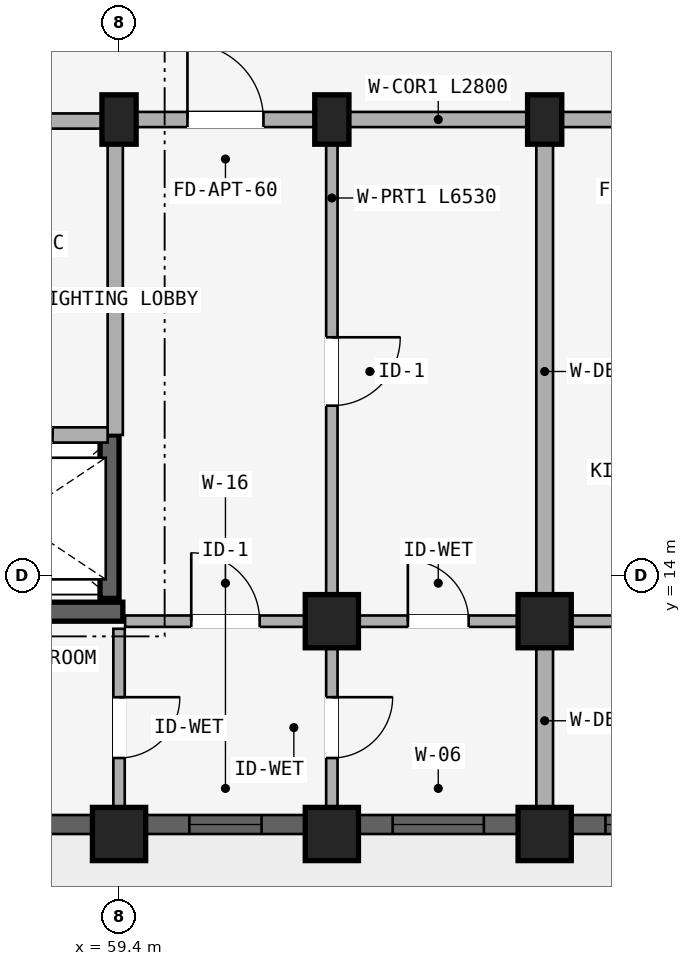
"""IFC4 building model, lengths in metres.
Left out: names, types, materials, properties, quantities, classifications, styles, units other than length and angle.
Written with IfcOpenShell. Run it as: python <this file> out.ifc"""

import sys

from ifc_helpers import new_model, si_unit, direction, frame, frame_2d, origin, origin_2d, place, context, subcontext, project, spatial, rectangle, extrude, element, fill, save


model = new_model("IFC4")
c1 = context("Model", 3, precision=1e-05, world=origin(), true_north=direction((0.0, 1.0)))
c2 = subcontext(c1, "Body", "Model", "MODEL_VIEW")
j1 = project(units=[si_unit("LENGTHUNIT", "METRE"), si_unit("PLANEANGLEUNIT", "RADIAN")], contexts=[c1])
p1 = place(None, origin())
s1 = spatial("IfcSite", under=j1, at=p1, CompositionType="ELEMENT")
p2 = place(p1, origin())
s2 = spatial("IfcBuilding", under=s1, at=p2, CompositionType="ELEMENT")
p3 = place(p2, frame((0.0, 0.0, 27.6)))
s3 = spatial("IfcBuildingStorey", under=s2, at=p3, CompositionType="ELEMENT", Elevation=27.6)
p4 = place(p3, frame((56.65, 13.525, 0.0), z_axis=(0.0, 0.0, 1.0), x_axis=(1.0, 0.0, 0.0)))
e1 = element("IfcWall", 1, at=p4, inside=s3, PredefinedType="SHEAR", context=c2, shape_type="SweptSolid", body=[
    extrude(rectangle(XDim=2.8, YDim=0.25, at=frame_2d((1.4, 0.0))), origin(), (0.0, 0.0, 1.0), 2.93),
])
p5 = place(p3, frame((59.275, 15.85, 0.0), z_axis=(0.0, 0.0, 1.0), x_axis=(0.0, -1.0, 0.0)))
e2 = element("IfcWall", 2, at=p5, inside=s3, PredefinedType="SHEAR", context=c2, shape_type="SweptSolid", body=[
    extrude(rectangle(XDim=2.15, YDim=0.25, at=frame_2d((1.075, 0.0))), origin(), (0.0, 0.0, 1.0), 2.93),
])
p6 = place(p3, frame((59.4, 20.0, 0.0), z_axis=(0.0, 0.0, 1.0), x_axis=(1.0, 0.0, 0.0)))
e3 = element("IfcColumn", 3, at=p6, inside=s3, PredefinedType="COLUMN", context=c2, shape_type="SweptSolid", body=[
    extrude(rectangle(XDim=0.45, YDim=0.65, at=origin_2d()), origin(), (0.0, 0.0, 1.0), 2.93),
])
p7 = place(p3, frame((59.4, 10.6, 0.0), z_axis=(0.0, 0.0, 1.0), x_axis=(1.0, 0.0, 0.0)))
e4 = element("IfcColumn", 4, at=p7, inside=s3, PredefinedType="COLUMN", context=c2, shape_type="SweptSolid", body=[
    extrude(rectangle(XDim=0.7, YDim=0.7, at=origin_2d()), origin(), (0.0, 0.0, 1.0), 2.97),
])
p8 = place(p3, frame((62.2, 20.0, 0.0), z_axis=(0.0, 0.0, 1.0), x_axis=(1.0, 0.0, 0.0)))
e5 = element("IfcColumn", 5, at=p8, inside=s3, PredefinedType="COLUMN", context=c2, shape_type="SweptSolid", body=[
    extrude(rectangle(XDim=0.45, YDim=0.65, at=origin_2d()), origin(), (0.0, 0.0, 1.0), 2.93),
])
p9 = place(p3, frame((62.2, 13.4, 0.0), z_axis=(0.0, 0.0, 1.0), x_axis=(1.0, 0.0, 0.0)))
e6 = element("IfcColumn", 6, at=p9, inside=s3, PredefinedType="COLUMN", context=c2, shape_type="SweptSolid", body=[
    extrude(rectangle(XDim=0.7, YDim=0.7, at=origin_2d()), origin(), (0.0, 0.0, 1.0), 2.93),
])
p10 = place(p3, frame((62.2, 10.6, 0.0), z_axis=(0.0, 0.0, 1.0), x_axis=(1.0, 0.0, 0.0)))
e7 = element("IfcColumn", 7, at=p10, inside=s3, PredefinedType="COLUMN", context=c2, shape_type="SweptSolid", body=[
    extrude(rectangle(XDim=0.7, YDim=0.7, at=origin_2d()), origin(), (0.0, 0.0, 1.0), 2.97),
])
p11 = place(p3, frame((65.0, 20.0, 0.0), z_axis=(0.0, 0.0, 1.0), x_axis=(1.0, 0.0, 0.0)))
e8 = element("IfcColumn", 8, at=p11, inside=s3, PredefinedType="COLUMN", context=c2, shape_type="SweptSolid", body=[
    extrude(rectangle(XDim=0.45, YDim=0.65, at=origin_2d()), origin(), (0.0, 0.0, 1.0), 2.93),
])
p12 = place(p3, frame((65.0, 13.4, 0.0), z_axis=(0.0, 0.0, 1.0), x_axis=(1.0, 0.0, 0.0)))
e9 = element("IfcColumn", 9, at=p12, inside=s3, PredefinedType="COLUMN", context=c2, shape_type="SweptSolid", body=[
    extrude(rectangle(XDim=0.7, YDim=0.7, at=origin_2d()), origin(), (0.0, 0.0, 1.0), 2.93),
])
p13 = place(p3, frame((65.0, 10.6, 0.0), z_axis=(0.0, 0.0, 1.0), x_axis=(1.0, 0.0, 0.0)))
e10 = element("IfcColumn", 10, at=p13, inside=s3, PredefinedType="COLUMN", context=c2, shape_type="SweptSolid", body=[
    extrude(rectangle(XDim=0.7, YDim=0.7, at=origin_2d()), origin(), (0.0, 0.0, 1.0), 2.97),
])
p14 = place(p3, frame((53.7, 19.98, 0.0), z_axis=(0.0, 0.0, 1.0), x_axis=(1.0, 0.0, 0.0)))
e11 = element("IfcWall", 11, at=p14, inside=s3, PredefinedType="STANDARD", context=c2, shape_type="SweptSolid", body=[
    extrude(rectangle(XDim=5.65, YDim=0.2, at=frame_2d((2.825, 0.0))), origin(), (0.0, 0.0, 1.0), 2.372),
])
p15 = place(p14, frame((1.923, 0.0, 0.0)))
e12 = element("IfcOpeningElement", 12, at=p15, cuts=e11, PredefinedType="OPENING", context=c2, shape_type="SweptSolid", body=[
    extrude(rectangle(XDim=1.24, YDim=2.15, at=frame_2d((0.62, 1.075))), frame((0.0, 0.11, 0.0), z_axis=(0.0, -1.0, 0.0), x_axis=(1.0, 0.0, 0.0)), (0.0, 0.0, 1.0), 0.22),
])
p16 = place(p3, frame((59.35, 19.98, 0.0), z_axis=(0.0, 0.0, 1.0), x_axis=(0.0, -1.0, 0.0)))
e13 = element("IfcWall", 13, at=p16, inside=s3, PredefinedType="STANDARD", context=c2, shape_type="SweptSolid", body=[
    extrude(rectangle(XDim=4.13, YDim=0.2, at=frame_2d((2.065, 0.0))), origin(), (0.0, 0.0, 1.0), 2.372),
])
p17 = place(p3, frame((56.7, 15.85, 0.0), z_axis=(0.0, 0.0, 1.0), x_axis=(1.0, 0.0, 0.0)))
e14 = element("IfcWall", 14, at=p17, inside=s3, PredefinedType="STANDARD", context=c2, shape_type="SweptSolid", body=[
    extrude(rectangle(XDim=2.55, YDim=0.2, at=frame_2d((1.275, 0.0))), origin(), (0.0, 0.0, 1.0), 2.372),
])
p18 = place(p17, frame((0.725, 0.0, 0.0)))
e15 = element("IfcOpeningElement", 15, at=p18, cuts=e14, PredefinedType="OPENING", context=c2, shape_type="SweptSolid", body=[
    extrude(rectangle(XDim=1.1, YDim=2.15, at=frame_2d((0.55, 1.075))), frame((0.0, 0.11, 0.0), z_axis=(0.0, -1.0, 0.0), x_axis=(1.0, 0.0, 0.0)), (0.0, 0.0, 1.0), 0.22),
])
p19 = place(p3, frame((59.4, 20.0, 0.0), z_axis=(0.0, 0.0, 1.0), x_axis=(1.0, 0.0, 0.0)))
e16 = element("IfcWall", 16, at=p19, inside=s3, PredefinedType="STANDARD", context=c2, shape_type="SweptSolid", body=[
    extrude(rectangle(XDim=2.8, YDim=0.2, at=frame_2d((1.4, 0.0))), origin(), (0.0, 0.0, 1.0), 2.372),
])
p20 = place(p19, frame((0.9, 0.0, 0.0)))
e17 = element("IfcOpeningElement", 17, at=p20, cuts=e16, PredefinedType="OPENING", context=c2, shape_type="SweptSolid", body=[
    extrude(rectangle(XDim=1.0, YDim=2.15, at=frame_2d((0.5, 1.075))), frame((0.0, 0.11, 0.0), z_axis=(0.0, -1.0, 0.0), x_axis=(1.0, 0.0, 0.0)), (0.0, 0.0, 1.0), 0.22),
])
p21 = place(p3, frame((59.48, 13.4, 0.0), z_axis=(0.0, 0.0, 1.0), x_axis=(1.0, 0.0, 0.0)))
e18 = element("IfcWall", 18, at=p21, inside=s3, PredefinedType="PLUMBINGWALL", context=c2, shape_type="SweptSolid", body=[
    extrude(rectangle(XDim=2.64, YDim=0.15, at=frame_2d((1.32, 0.0))), origin(), (0.0, 0.0, 1.0), 2.372),
])
p22 = place(p21, frame((0.87, 0.0, 0.0)))
e19 = element("IfcOpeningElement", 19, at=p22, cuts=e18, PredefinedType="OPENING", context=c2, shape_type="SweptSolid", body=[
    extrude(rectangle(XDim=0.9, YDim=2.1, at=frame_2d((0.45, 1.05))), frame((0.0, 0.085, 0.0), z_axis=(0.0, -1.0, 0.0), x_axis=(1.0, 0.0, 0.0)), (0.0, 0.0, 1.0), 0.17),
])
p23 = place(p3, frame((62.2, 20.0, 0.0), z_axis=(0.0, 0.0, 1.0), x_axis=(1.0, 0.0, 0.0)))
e20 = element("IfcWall", 20, at=p23, inside=s3, PredefinedType="STANDARD", context=c2, shape_type="SweptSolid", body=[
    extrude(rectangle(XDim=2.8, YDim=0.2, at=frame_2d((1.4, 0.0))), origin(), (0.0, 0.0, 1.0), 2.372),
])
p24 = place(p3, frame((62.28, 13.4, 0.0), z_axis=(0.0, 0.0, 1.0), x_axis=(1.0, 0.0, 0.0)))
e21 = element("IfcWall", 21, at=p24, inside=s3, PredefinedType="PLUMBINGWALL", context=c2, shape_type="SweptSolid", body=[
    extrude(rectangle(XDim=2.64, YDim=0.15, at=frame_2d((1.32, 0.0))), origin(), (0.0, 0.0, 1.0), 2.372),
])
p25 = place(p24, frame((0.92, 0.0, 0.0)))
e22 = element("IfcOpeningElement", 22, at=p25, cuts=e21, PredefinedType="OPENING", context=c2, shape_type="SweptSolid", body=[
    extrude(rectangle(XDim=0.8, YDim=2.1, at=frame_2d((0.4, 1.05))), frame((0.0, 0.085, 0.0), z_axis=(0.0, -1.0, 0.0), x_axis=(1.0, 0.0, 0.0)), (0.0, 0.0, 1.0), 0.17),
])
p26 = place(p3, frame((65.0, 20.0, 0.0), z_axis=(0.0, 0.0, 1.0), x_axis=(1.0, 0.0, 0.0)))
e23 = element("IfcWall", 23, at=p26, inside=s3, PredefinedType="STANDARD", context=c2, shape_type="SweptSolid", body=[
    extrude(rectangle(XDim=2.8, YDim=0.2, at=frame_2d((1.4, 0.0))), origin(), (0.0, 0.0, 1.0), 2.372),
])
p27 = place(p26, frame((0.9, 0.0, 0.0)))
e24 = element("IfcOpeningElement", 24, at=p27, cuts=e23, PredefinedType="OPENING", context=c2, shape_type="SweptSolid", body=[
    extrude(rectangle(XDim=1.0, YDim=2.15, at=frame_2d((0.5, 1.075))), frame((0.0, 0.11, 0.0), z_axis=(0.0, -1.0, 0.0), x_axis=(1.0, 0.0, 0.0)), (0.0, 0.0, 1.0), 0.22),
])
p28 = place(p3, frame((65.08, 13.4, 0.0), z_axis=(0.0, 0.0, 1.0), x_axis=(1.0, 0.0, 0.0)))
e25 = element("IfcWall", 25, at=p28, inside=s3, PredefinedType="PLUMBINGWALL", context=c2, shape_type="SweptSolid", body=[
    extrude(rectangle(XDim=2.64, YDim=0.15, at=frame_2d((1.32, 0.0))), origin(), (0.0, 0.0, 1.0), 2.372),
])
p29 = place(p28, frame((0.87, 0.0, 0.0)))
e26 = element("IfcOpeningElement", 26, at=p29, cuts=e25, PredefinedType="OPENING", context=c2, shape_type="SweptSolid", body=[
    extrude(rectangle(XDim=0.9, YDim=2.1, at=frame_2d((0.45, 1.05))), frame((0.0, 0.085, 0.0), z_axis=(0.0, -1.0, 0.0), x_axis=(1.0, 0.0, 0.0)), (0.0, 0.0, 1.0), 0.17),
])
p30 = place(p3, frame((59.4, 13.3, 0.0), z_axis=(0.0, 0.0, 1.0), x_axis=(0.0, -1.0, 0.0)))
e27 = element("IfcWall", 27, at=p30, inside=s3, PredefinedType="PARTITIONING", context=c2, shape_type="SweptSolid", body=[
    extrude(rectangle(XDim=2.42, YDim=0.15, at=frame_2d((1.21, 0.0))), origin(), (0.0, 0.0, 1.0), 2.372),
])
p31 = place(p30, frame((0.9, 0.0, 0.0)))
e28 = element("IfcOpeningElement", 28, at=p31, cuts=e27, PredefinedType="OPENING", context=c2, shape_type="SweptSolid", body=[
    extrude(rectangle(XDim=0.8, YDim=2.1, at=frame_2d((0.4, 1.05))), frame((0.0, 0.085, 0.0), z_axis=(0.0, -1.0, 0.0), x_axis=(1.0, 0.0, 0.0)), (0.0, 0.0, 1.0), 0.17),
])
p32 = place(p3, frame((62.2, 19.95, 0.0), z_axis=(0.0, 0.0, 1.0), x_axis=(0.0, -1.0, 0.0)))
e29 = element("IfcWall", 29, at=p32, inside=s3, PredefinedType="PARTITIONING", context=c2, shape_type="SweptSolid", body=[
    extrude(rectangle(XDim=6.53, YDim=0.15, at=frame_2d((3.265, 0.0))), origin(), (0.0, 0.0, 1.0), 2.372),
])
p33 = place(p32, frame((2.815, 0.0, 0.0)))
e30 = element("IfcOpeningElement", 30, at=p33, cuts=e29, PredefinedType="OPENING", context=c2, shape_type="SweptSolid", body=[
    extrude(rectangle(XDim=0.9, YDim=2.1, at=frame_2d((0.45, 1.05))), frame((0.0, 0.085, 0.0), z_axis=(0.0, -1.0, 0.0), x_axis=(1.0, 0.0, 0.0)), (0.0, 0.0, 1.0), 0.17),
])
p34 = place(p3, frame((62.2, 13.3, 0.0), z_axis=(0.0, 0.0, 1.0), x_axis=(0.0, -1.0, 0.0)))
e31 = element("IfcWall", 31, at=p34, inside=s3, PredefinedType="PARTITIONING", context=c2, shape_type="SweptSolid", body=[
    extrude(rectangle(XDim=2.42, YDim=0.15, at=frame_2d((1.21, 0.0))), origin(), (0.0, 0.0, 1.0), 2.372),
])
p35 = place(p34, frame((0.9, 0.0, 0.0)))
e32 = element("IfcOpeningElement", 32, at=p35, cuts=e31, PredefinedType="OPENING", context=c2, shape_type="SweptSolid", body=[
    extrude(rectangle(XDim=0.8, YDim=2.1, at=frame_2d((0.4, 1.05))), frame((0.0, 0.085, 0.0), z_axis=(0.0, -1.0, 0.0), x_axis=(1.0, 0.0, 0.0)), (0.0, 0.0, 1.0), 0.17),
])
p36 = place(p3, frame((65.0, 19.95, 0.0), z_axis=(0.0, 0.0, 1.0), x_axis=(0.0, -1.0, 0.0)))
e33 = element("IfcWall", 33, at=p36, inside=s3, PredefinedType="STANDARD", context=c2, shape_type="SweptSolid", body=[
    extrude(rectangle(XDim=6.53, YDim=0.22, at=frame_2d((3.265, 0.0))), origin(), (0.0, 0.0, 1.0), 2.372),
])
p37 = place(p3, frame((65.0, 13.3, 0.0), z_axis=(0.0, 0.0, 1.0), x_axis=(0.0, -1.0, 0.0)))
e34 = element("IfcWall", 34, at=p37, inside=s3, PredefinedType="STANDARD", context=c2, shape_type="SweptSolid", body=[
    extrude(rectangle(XDim=2.42, YDim=0.22, at=frame_2d((1.21, 0.0))), origin(), (0.0, 0.0, 1.0), 2.372),
])
p38 = place(p3, frame((54.154, 10.725, 0.0), z_axis=(0.0, 0.0, 1.0), x_axis=(1.0, 0.0, 0.0)))
e35 = element("IfcWall", 35, at=p38, inside=s3, PredefinedType="STANDARD", context=c2, shape_type="SweptSolid", body=[
    extrude(rectangle(XDim=4.893, YDim=0.25, at=frame_2d((2.446, 0.0))), origin(), (0.0, 0.0, 1.0), 2.48),
])
p39 = place(p38, frame((1.896, 0.0, 0.83)))
e36 = element("IfcOpeningElement", 36, at=p39, cuts=e35, PredefinedType="OPENING", context=c2, shape_type="SweptSolid", body=[
    extrude(rectangle(XDim=1.1, YDim=1.45, at=frame_2d((0.55, 0.725))), frame((0.0, 0.135, 0.0), z_axis=(0.0, -1.0, 0.0), x_axis=(1.0, 0.0, 0.0)), (0.0, 0.0, 1.0), 0.27),
])
p40 = place(p3, frame((59.753, 10.725, 0.0), z_axis=(0.0, 0.0, 1.0), x_axis=(1.0, 0.0, 0.0)))
e37 = element("IfcWall", 37, at=p40, inside=s3, PredefinedType="STANDARD", context=c2, shape_type="SweptSolid", body=[
    extrude(rectangle(XDim=2.093, YDim=0.25, at=frame_2d((1.046, 0.0))), origin(), (0.0, 0.0, 1.0), 2.48),
])
p41 = place(p40, frame((0.572, 0.0, 0.88)))
e38 = element("IfcOpeningElement", 38, at=p41, cuts=e37, PredefinedType="OPENING", context=c2, shape_type="SweptSolid", body=[
    extrude(rectangle(XDim=0.95, YDim=1.35, at=frame_2d((0.475, 0.675))), frame((0.0, 0.135, 0.0), z_axis=(0.0, -1.0, 0.0), x_axis=(1.0, 0.0, 0.0)), (0.0, 0.0, 1.0), 0.27),
])
p42 = place(p3, frame((62.553, 10.725, 0.0), z_axis=(0.0, 0.0, 1.0), x_axis=(1.0, 0.0, 0.0)))
e39 = element("IfcWall", 39, at=p42, inside=s3, PredefinedType="STANDARD", context=c2, shape_type="SweptSolid", body=[
    extrude(rectangle(XDim=2.093, YDim=0.25, at=frame_2d((1.046, 0.0))), origin(), (0.0, 0.0, 1.0), 2.48),
])
p43 = place(p42, frame((0.447, 0.0, 0.78)))
e40 = element("IfcOpeningElement", 40, at=p43, cuts=e39, PredefinedType="OPENING", context=c2, shape_type="SweptSolid", body=[
    extrude(rectangle(XDim=1.2, YDim=1.5, at=frame_2d((0.6, 0.75))), frame((0.0, 0.135, 0.0), z_axis=(0.0, -1.0, 0.0), x_axis=(1.0, 0.0, 0.0)), (0.0, 0.0, 1.0), 0.27),
])
p44 = place(p3, frame((65.354, 10.725, 0.0), z_axis=(0.0, 0.0, 1.0), x_axis=(1.0, 0.0, 0.0)))
e41 = element("IfcWall", 41, at=p44, inside=s3, PredefinedType="STANDARD", context=c2, shape_type="SweptSolid", body=[
    extrude(rectangle(XDim=2.093, YDim=0.25, at=frame_2d((1.046, 0.0))), origin(), (0.0, 0.0, 1.0), 2.48),
])
p45 = place(p44, frame((0.447, 0.0, 0.78)))
e42 = element("IfcOpeningElement", 42, at=p45, cuts=e41, PredefinedType="OPENING", context=c2, shape_type="SweptSolid", body=[
    extrude(rectangle(XDim=1.2, YDim=1.5, at=frame_2d((0.6, 0.75))), frame((0.0, 0.135, 0.0), z_axis=(0.0, -1.0, 0.0), x_axis=(1.0, 0.0, 0.0)), (0.0, 0.0, 1.0), 0.27),
])
p46 = place(p41, origin())
e43 = element("IfcWindow", 43, at=p46, inside=s3, PartitioningType="SINGLE_PANEL", PredefinedType="WINDOW", context=c2, shape_type="SweptSolid", body=[
    extrude(rectangle(XDim=0.95, YDim=1.35, at=frame_2d((0.475, 0.675))), frame((0.0, 0.03, 0.0), z_axis=(0.0, -1.0, 0.0), x_axis=(1.0, 0.0, 0.0)), (0.0, 0.0, 1.0), 0.06),
])
fill(e38, e43)
p47 = place(p43, origin())
e44 = element("IfcWindow", 44, at=p47, inside=s3, PartitioningType="SINGLE_PANEL", PredefinedType="WINDOW", context=c2, shape_type="SweptSolid", body=[
    extrude(rectangle(XDim=1.2, YDim=1.5, at=frame_2d((0.6, 0.75))), frame((0.0, 0.03, 0.0), z_axis=(0.0, -1.0, 0.0), x_axis=(1.0, 0.0, 0.0)), (0.0, 0.0, 1.0), 0.06),
])
fill(e40, e44)
p48 = place(p45, origin())
e45 = element("IfcWindow", 45, at=p48, inside=s3, PartitioningType="SINGLE_PANEL", PredefinedType="WINDOW", context=c2, shape_type="SweptSolid", body=[
    extrude(rectangle(XDim=1.2, YDim=1.5, at=frame_2d((0.6, 0.75))), frame((0.0, 0.03, 0.0), z_axis=(0.0, -1.0, 0.0), x_axis=(1.0, 0.0, 0.0)), (0.0, 0.0, 1.0), 0.06),
])
fill(e42, e45)
p49 = place(p18, origin())
e46 = element("IfcDoor", 46, at=p49, inside=s3, OperationType="SLIDING_TO_LEFT", PredefinedType="DOOR", context=c2, shape_type="SweptSolid", body=[
    extrude(rectangle(XDim=1.1, YDim=2.15, at=frame_2d((0.55, 1.075))), frame((0.0, 0.025, 0.0), z_axis=(0.0, -1.0, 0.0), x_axis=(1.0, 0.0, 0.0)), (0.0, 0.0, 1.0), 0.05),
])
fill(e15, e46)
p50 = place(p22, frame((0.9, 0.0, 0.0), z_axis=(0.0, 0.0, 1.0), x_axis=(-1.0, 0.0, 0.0)))
e47 = element("IfcDoor", 47, at=p50, inside=s3, OperationType="SINGLE_SWING_RIGHT", PredefinedType="DOOR", context=c2, shape_type="SweptSolid", body=[
    extrude(rectangle(XDim=0.9, YDim=2.1, at=frame_2d((0.45, 1.05))), frame((0.0, 0.025, 0.0), z_axis=(0.0, -1.0, 0.0), x_axis=(1.0, 0.0, 0.0)), (0.0, 0.0, 1.0), 0.05),
])
fill(e19, e47)
p51 = place(p20, origin())
e48 = element("IfcDoor", 48, at=p51, inside=s3, OperationType="SINGLE_SWING_LEFT", PredefinedType="DOOR", context=c2, shape_type="SweptSolid", body=[
    extrude(rectangle(XDim=1.0, YDim=2.15, at=frame_2d((0.5, 1.075))), frame((0.0, 0.025, 0.0), z_axis=(0.0, -1.0, 0.0), x_axis=(1.0, 0.0, 0.0)), (0.0, 0.0, 1.0), 0.05),
])
fill(e17, e48)
p52 = place(p25, frame((0.8, 0.0, 0.0), z_axis=(0.0, 0.0, 1.0), x_axis=(-1.0, 0.0, 0.0)))
e49 = element("IfcDoor", 49, at=p52, inside=s3, OperationType="SINGLE_SWING_RIGHT", PredefinedType="DOOR", context=c2, shape_type="SweptSolid", body=[
    extrude(rectangle(XDim=0.8, YDim=2.1, at=frame_2d((0.4, 1.05))), frame((0.0, 0.025, 0.0), z_axis=(0.0, -1.0, 0.0), x_axis=(1.0, 0.0, 0.0)), (0.0, 0.0, 1.0), 0.05),
])
fill(e22, e49)
p53 = place(p31, frame((0.8, 0.0, 0.0), z_axis=(0.0, 0.0, 1.0), x_axis=(-1.0, 0.0, 0.0)))
e50 = element("IfcDoor", 50, at=p53, inside=s3, OperationType="SINGLE_SWING_RIGHT", PredefinedType="DOOR", context=c2, shape_type="SweptSolid", body=[
    extrude(rectangle(XDim=0.8, YDim=2.1, at=frame_2d((0.4, 1.05))), frame((0.0, 0.025, 0.0), z_axis=(0.0, -1.0, 0.0), x_axis=(1.0, 0.0, 0.0)), (0.0, 0.0, 1.0), 0.05),
])
fill(e28, e50)
p54 = place(p33, frame((0.9, 0.0, 0.0), z_axis=(0.0, 0.0, 1.0), x_axis=(-1.0, 0.0, 0.0)))
e51 = element("IfcDoor", 51, at=p54, inside=s3, OperationType="SINGLE_SWING_RIGHT", PredefinedType="DOOR", context=c2, shape_type="SweptSolid", body=[
    extrude(rectangle(XDim=0.9, YDim=2.1, at=frame_2d((0.45, 1.05))), frame((0.0, 0.025, 0.0), z_axis=(0.0, -1.0, 0.0), x_axis=(1.0, 0.0, 0.0)), (0.0, 0.0, 1.0), 0.05),
])
fill(e30, e51)
p55 = place(p35, origin())
e52 = element("IfcDoor", 52, at=p55, inside=s3, OperationType="SINGLE_SWING_LEFT", PredefinedType="DOOR", context=c2, shape_type="SweptSolid", body=[
    extrude(rectangle(XDim=0.8, YDim=2.1, at=frame_2d((0.4, 1.05))), frame((0.0, 0.025, 0.0), z_axis=(0.0, -1.0, 0.0), x_axis=(1.0, 0.0, 0.0)), (0.0, 0.0, 1.0), 0.05),
])
fill(e32, e52)
save(model, sys.argv[1])
